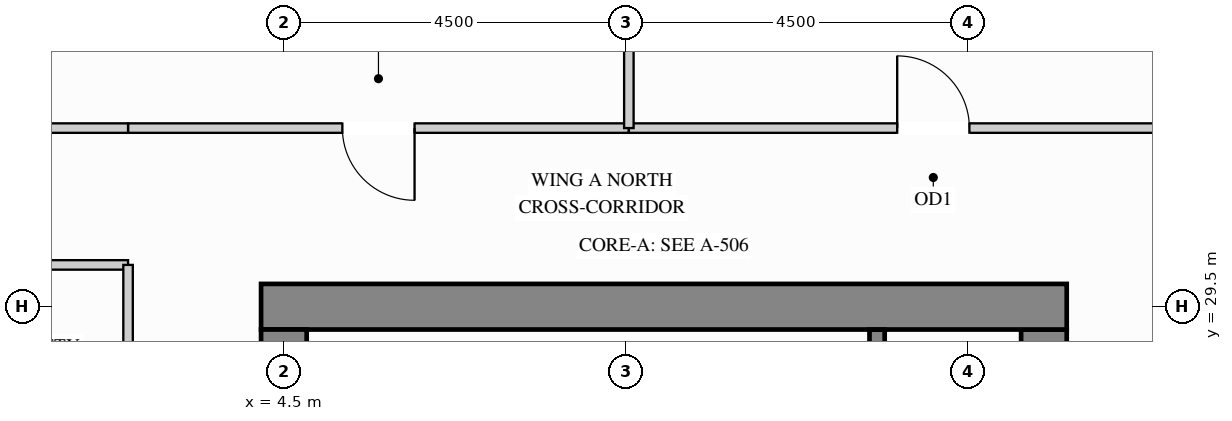
"""IFC4 building model, lengths in metres.
Left out: names, types, materials, properties, quantities, classifications, styles, units other than length and angle.
Written with IfcOpenShell. Run it as: python <this file> out.ifc"""

import sys

from ifc_helpers import new_model, si_unit, direction, frame, frame_2d, origin, place, context, subcontext, project, spatial, rectangle, extrude, source, transform, mapped, element, fill, save


model = new_model("IFC4")
c1 = context("Model", 3, precision=1e-05, world=origin(), true_north=direction((0.0, 1.0)))
c2 = subcontext(c1, "Body", "Model", "MODEL_VIEW")
j1 = project(units=[si_unit("LENGTHUNIT", "METRE"), si_unit("PLANEANGLEUNIT", "RADIAN")], contexts=[c1])
p1 = place(None, origin())
s1 = spatial("IfcSite", under=j1, at=p1, CompositionType="ELEMENT")
p2 = place(p1, origin())
s2 = spatial("IfcBuilding", under=s1, at=p2, CompositionType="ELEMENT")
p3 = place(p2, frame((0.0, 0.0, 182.7)))
s3 = spatial("IfcBuildingStorey", under=s2, at=p3, CompositionType="ELEMENT", Elevation=182.7)
m1 = source(origin(), c2, "Body", "SweptSolid", [
    extrude(rectangle(XDim=8.32, YDim=0.6, at=frame_2d((4.16, 0.0))), origin(), (0.0, 0.0, 1.0), 3.4),
])
p4 = place(p3, frame((14.5, 20.88, 0.0), z_axis=(0.0, 0.0, 1.0), x_axis=(0.0, 1.0, 0.0)))
e1 = element("IfcWall", 1, at=p4, inside=s3, PredefinedType="SHEAR", context=c2, shape_type="MappedRepresentation", body=[
    mapped(m1, transform((0.0, 0.0, 0.0), x_axis=(1.0, 0.0, 0.0), y_axis=(0.0, 1.0, 0.0), z_axis=(0.0, 0.0, 1.0))),
])
m2 = source(origin(), c2, "Body", "SweptSolid", [
    extrude(rectangle(XDim=10.6, YDim=0.6, at=frame_2d((5.3, 0.0))), origin(), (0.0, 0.0, 1.0), 3.4),
])
p5 = place(p3, frame((4.2, 29.5, 0.0), z_axis=(0.0, 0.0, 1.0), x_axis=(1.0, 0.0, 0.0)))
e2 = element("IfcWall", 2, at=p5, inside=s3, PredefinedType="SHEAR", context=c2, shape_type="MappedRepresentation", body=[
    mapped(m2, transform((0.0, 0.0, 0.0), x_axis=(1.0, 0.0, 0.0), y_axis=(0.0, 1.0, 0.0), z_axis=(0.0, 0.0, 1.0))),
])
m3 = source(origin(), c2, "Body", "SweptSolid", [
    extrude(rectangle(XDim=20.4, YDim=0.6, at=frame_2d((10.2, 0.0))), origin(), (0.0, 0.0, 1.0), 3.4),
])
p6 = place(p3, frame((4.5, 8.8, 0.0), z_axis=(0.0, 0.0, 1.0), x_axis=(0.0, 1.0, 0.0)))
e3 = element("IfcWall", 3, at=p6, inside=s3, PredefinedType="SHEAR", context=c2, shape_type="MappedRepresentation", body=[
    mapped(m3, transform((0.0, 0.0, 0.0), x_axis=(1.0, 0.0, 0.0), y_axis=(0.0, 1.0, 0.0), z_axis=(0.0, 0.0, 1.0))),
])
p7 = place(p3, frame((2.45, 31.85, 0.0), z_axis=(0.0, 0.0, 1.0), x_axis=(1.0, 0.0, 0.0)))
e4 = element("IfcWall", 4, at=p7, inside=s3, PredefinedType="PARTITIONING", context=c2, shape_type="SweptSolid", body=[
    extrude(rectangle(XDim=6.589, YDim=0.125, at=frame_2d((3.294, 0.0))), origin(), (0.0, 0.0, 1.0), 2.848),
])
p8 = place(p7, frame((2.82, 0.0, 0.0)))
e5 = element("IfcOpeningElement", 5, at=p8, cuts=e4, PredefinedType="OPENING", context=c2, shape_type="SweptSolid", body=[
    extrude(rectangle(XDim=0.95, YDim=2.15, at=frame_2d((0.475, 1.075))), frame((0.0, 0.073, 0.0), z_axis=(0.0, -1.0, 0.0), x_axis=(1.0, 0.0, 0.0)), (0.0, 0.0, 1.0), 0.145),
])
p9 = place(p3, frame((9.039, 31.85, 0.0), z_axis=(0.0, 0.0, 1.0), x_axis=(1.0, 0.0, 0.0)))
e6 = element("IfcWall", 6, at=p9, inside=s3, PredefinedType="PARTITIONING", context=c2, shape_type="SweptSolid", body=[
    extrude(rectangle(XDim=8.011, YDim=0.125, at=frame_2d((4.005, 0.0))), origin(), (0.0, 0.0, 1.0), 2.848),
])
p10 = place(p9, frame((3.531, 0.0, 0.0)))
e7 = element("IfcOpeningElement", 7, at=p10, cuts=e6, PredefinedType="OPENING", context=c2, shape_type="SweptSolid", body=[
    extrude(rectangle(XDim=0.95, YDim=2.15, at=frame_2d((0.475, 1.075))), frame((0.0, 0.073, 0.0), z_axis=(0.0, -1.0, 0.0), x_axis=(1.0, 0.0, 0.0)), (0.0, 0.0, 1.0), 0.145),
])
m4 = source(origin(), c2, "Body", "SweptSolid", [
    extrude(rectangle(XDim=2.098, YDim=0.125, at=frame_2d((1.049, 0.0))), origin(), (0.0, 0.0, 1.0), 2.848),
])
p11 = place(p3, frame((0.352, 31.85, 0.0), z_axis=(0.0, 0.0, 1.0), x_axis=(1.0, 0.0, 0.0)))
e8 = element("IfcWall", 8, at=p11, inside=s3, PredefinedType="PARTITIONING", context=c2, shape_type="MappedRepresentation", body=[
    mapped(m4, transform((0.0, 0.0, 0.0), x_axis=(1.0, 0.0, 0.0), y_axis=(0.0, 1.0, 0.0), z_axis=(0.0, 0.0, 1.0))),
])
m5 = source(origin(), c2, "Body", "SweptSolid", [
    extrude(rectangle(XDim=5.53, YDim=0.125, at=frame_2d((2.765, 0.0))), origin(), (0.0, 0.0, 1.0), 3.385),
])
p12 = place(p3, frame((9.039, 31.85, 0.0), z_axis=(0.0, 0.0, 1.0), x_axis=(0.0, 1.0, 0.0)))
e9 = element("IfcWall", 9, at=p12, inside=s3, PredefinedType="PARTITIONING", context=c2, shape_type="MappedRepresentation", body=[
    mapped(m5, transform((0.0, 0.0, 0.0), x_axis=(1.0, 0.0, 0.0), y_axis=(0.0, 1.0, 0.0), z_axis=(0.0, 0.0, 1.0))),
])
m6 = source(origin(), c2, "Body", "SweptSolid", [
    extrude(rectangle(XDim=1.33, YDim=0.125, at=frame_2d((0.665, 0.0))), origin(), (0.0, 0.0, 1.0), 3.385),
])
p13 = place(p3, frame((1.12, 30.05, 0.0), z_axis=(0.0, 0.0, 1.0), x_axis=(1.0, 0.0, 0.0)))
e10 = element("IfcWall", 10, at=p13, inside=s3, PredefinedType="PARTITIONING", context=c2, shape_type="MappedRepresentation", body=[
    mapped(m6, transform((0.0, 0.0, 0.0), x_axis=(1.0, 0.0, 0.0), y_axis=(0.0, 1.0, 0.0), z_axis=(0.0, 0.0, 1.0))),
])
p14 = place(p3, frame((2.45, 22.6, 0.0), z_axis=(0.0, 0.0, 1.0), x_axis=(0.0, 1.0, 0.0)))
e11 = element("IfcWall", 11, at=p14, inside=s3, PredefinedType="PARTITIONING", context=c2, shape_type="SweptSolid", body=[
    extrude(rectangle(XDim=7.45, YDim=0.125, at=frame_2d((3.725, 0.0))), origin(), (0.0, 0.0, 1.0), 3.385),
])
p15 = place(p14, frame((3.25, 0.0, 0.0)))
e12 = element("IfcOpeningElement", 12, at=p15, cuts=e11, PredefinedType="OPENING", context=c2, shape_type="SweptSolid", body=[
    extrude(rectangle(XDim=0.95, YDim=2.15, at=frame_2d((0.475, 1.075))), frame((0.0, 0.073, 0.0), z_axis=(0.0, -1.0, 0.0), x_axis=(1.0, 0.0, 0.0)), (0.0, 0.0, 1.0), 0.145),
])
m7 = source(origin(), c2, "Body", "SweptSolid", [
    extrude(rectangle(XDim=3.753, YDim=0.2, at=frame_2d((1.876, 0.0))), origin(), (0.0, 0.0, 1.0), 3.4),
])
p16 = place(p3, frame((12.305, 25.445, 0.0), z_axis=(0.0, 0.0, 1.0), x_axis=(0.0, 1.0, 0.0)))
e13 = element("IfcWall", 13, at=p16, inside=s3, PredefinedType="SHEAR", context=c2, shape_type="MappedRepresentation", body=[
    mapped(m7, transform((0.0, 0.0, 0.0), x_axis=(1.0, 0.0, 0.0), y_axis=(0.0, 1.0, 0.0), z_axis=(0.0, 0.0, 1.0))),
])
m8 = source(origin(), c2, "Body", "SweptSolid", [
    extrude(rectangle(XDim=0.95, YDim=2.15, at=frame_2d((0.475, 1.075))), frame((0.0, 0.025, 0.0), z_axis=(0.0, -1.0, 0.0), x_axis=(1.0, 0.0, 0.0)), (0.0, 0.0, 1.0), 0.05),
])
p17 = place(p8, origin())
e14 = element("IfcDoor", 14, at=p17, inside=s3, OperationType="SINGLE_SWING_RIGHT", PredefinedType="DOOR", context=c2, shape_type="MappedRepresentation", body=[
    mapped(m8, transform((0.0, 0.0, 0.0), x_axis=(1.0, 0.0, 0.0), y_axis=(0.0, 1.0, 0.0), z_axis=(0.0, 0.0, 1.0))),
])
fill(e5, e14)
p18 = place(p10, origin())
e15 = element("IfcDoor", 15, at=p18, inside=s3, OperationType="SINGLE_SWING_LEFT", PredefinedType="DOOR", context=c2, shape_type="MappedRepresentation", body=[
    mapped(m8, transform((0.0, 0.0, 0.0), x_axis=(1.0, 0.0, 0.0), y_axis=(0.0, 1.0, 0.0), z_axis=(0.0, 0.0, 1.0))),
])
fill(e7, e15)
save(model, sys.argv[1])
